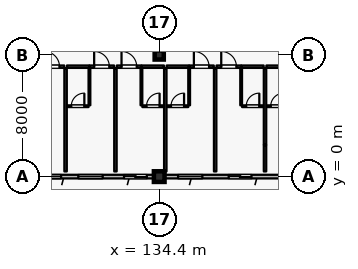
"""IFC4 building model, lengths in metres.
Left out: names, types, materials, properties, quantities, classifications, styles, units other than length and angle.
Written with IfcOpenShell. Run it as: python <this file> out.ifc"""

import sys

from ifc_helpers import new_model, si_unit, direction, frame, frame_2d, origin, origin_2d, place, context, subcontext, project, spatial, rectangle, extrude, element, fill, save


model = new_model("IFC4")
c1 = context("Model", 3, precision=1e-05, world=origin(), true_north=direction((0.0, 1.0)))
c2 = subcontext(c1, "Body", "Model", "MODEL_VIEW")
j1 = project(units=[si_unit("LENGTHUNIT", "METRE"), si_unit("PLANEANGLEUNIT", "RADIAN")], contexts=[c1])
p1 = place(None, origin())
s1 = spatial("IfcSite", under=j1, at=p1, CompositionType="ELEMENT")
p2 = place(p1, origin())
s2 = spatial("IfcBuilding", under=s1, at=p2, CompositionType="ELEMENT")
p3 = place(p2, frame((0.0, 0.0, 36.0)))
s3 = spatial("IfcBuildingStorey", under=s2, at=p3, CompositionType="ELEMENT", Elevation=36.0)
p4 = place(p3, frame((134.4, 0.0, 0.0), z_axis=(0.0, 0.0, 1.0), x_axis=(1.0, 0.0, 0.0)))
e1 = element("IfcColumn", 1, at=p4, inside=s3, PredefinedType="COLUMN", context=c2, shape_type="SweptSolid", body=[
    extrude(rectangle(XDim=0.7, YDim=0.7, at=origin_2d()), origin(), (0.0, 0.0, 1.0), 3.6),
])
p5 = place(p3, frame((134.4, 8.0, 0.0), z_axis=(0.0, 0.0, 1.0), x_axis=(1.0, 0.0, 0.0)))
e2 = element("IfcColumn", 2, at=p5, inside=s3, PredefinedType="COLUMN", context=c2, shape_type="SweptSolid", body=[
    extrude(rectangle(XDim=0.6, YDim=0.6, at=origin_2d()), origin(), (0.0, 0.0, 1.0), 3.6),
])
p6 = place(p3, frame((134.05, 0.0, 0.0), z_axis=(0.0, 0.0, 1.0), x_axis=(-1.0, 0.0, 0.0)))
e3 = element("IfcWall", 3, at=p6, inside=s3, PredefinedType="SOLIDWALL", context=c2, shape_type="SweptSolid", body=[
    extrude(rectangle(XDim=7.7, YDim=0.24, at=frame_2d((3.85, 0.0))), origin(), (0.0, 0.0, 1.0), 2.94),
])
p7 = place(p6, frame((0.465, 0.0, 0.0)))
e4 = element("IfcOpeningElement", 4, at=p7, cuts=e3, PredefinedType="OPENING", context=c2, shape_type="SweptSolid", body=[
    extrude(rectangle(XDim=1.5, YDim=2.25, at=frame_2d((0.75, 1.125))), frame((0.0, 0.13, 0.0), z_axis=(0.0, -1.0, 0.0), x_axis=(1.0, 0.0, 0.0)), (0.0, 0.0, 1.0), 0.26),
])
p8 = place(p6, frame((3.37, 0.0, 0.8)))
e5 = element("IfcOpeningElement", 5, at=p8, cuts=e3, PredefinedType="OPENING", context=c2, shape_type="SweptSolid", body=[
    extrude(rectangle(XDim=1.6, YDim=1.6, at=frame_2d((0.8, 0.8))), frame((0.0, 0.13, 0.0), z_axis=(0.0, -1.0, 0.0), x_axis=(1.0, 0.0, 0.0)), (0.0, 0.0, 1.0), 0.26),
])
p9 = place(p6, frame((6.105, 0.0, 0.8)))
e6 = element("IfcOpeningElement", 6, at=p9, cuts=e3, PredefinedType="OPENING", context=c2, shape_type="SweptSolid", body=[
    extrude(rectangle(XDim=1.4, YDim=1.6, at=frame_2d((0.7, 0.8))), frame((0.0, 0.13, 0.0), z_axis=(0.0, -1.0, 0.0), x_axis=(1.0, 0.0, 0.0)), (0.0, 0.0, 1.0), 0.26),
])
p10 = place(p3, frame((142.45, 0.0, 0.0), z_axis=(0.0, 0.0, 1.0), x_axis=(-1.0, 0.0, 0.0)))
e7 = element("IfcWall", 7, at=p10, inside=s3, PredefinedType="SOLIDWALL", context=c2, shape_type="SweptSolid", body=[
    extrude(rectangle(XDim=7.7, YDim=0.24, at=frame_2d((3.85, 0.0))), origin(), (0.0, 0.0, 1.0), 2.94),
])
p11 = place(p10, frame((1.98, 0.0, 0.0)))
e8 = element("IfcOpeningElement", 8, at=p11, cuts=e7, PredefinedType="OPENING", context=c2, shape_type="SweptSolid", body=[
    extrude(rectangle(XDim=1.5, YDim=2.25, at=frame_2d((0.75, 1.125))), frame((0.0, 0.13, 0.0), z_axis=(0.0, -1.0, 0.0), x_axis=(1.0, 0.0, 0.0)), (0.0, 0.0, 1.0), 0.26),
])
p12 = place(p10, frame((5.21, 0.0, 0.8)))
e9 = element("IfcOpeningElement", 9, at=p12, cuts=e7, PredefinedType="OPENING", context=c2, shape_type="SweptSolid", body=[
    extrude(rectangle(XDim=1.6, YDim=1.6, at=frame_2d((0.8, 0.8))), frame((0.0, 0.13, 0.0), z_axis=(0.0, -1.0, 0.0), x_axis=(1.0, 0.0, 0.0)), (0.0, 0.0, 1.0), 0.26),
])
p13 = place(p3, frame((126.53, 7.23, 0.0), z_axis=(0.0, 0.0, 1.0), x_axis=(1.0, 0.0, 0.0)))
e10 = element("IfcWall", 10, at=p13, inside=s3, PredefinedType="PARTITIONING", context=c2, shape_type="SweptSolid", body=[
    extrude(rectangle(XDim=1.62, YDim=0.16, at=frame_2d((0.81, 0.0))), origin(), (0.0, 0.0, 1.0), 3.365),
])
p14 = place(p13, frame((0.31, 0.0, 0.0)))
e11 = element("IfcOpeningElement", 11, at=p14, cuts=e10, PredefinedType="OPENING", context=c2, shape_type="SweptSolid", body=[
    extrude(rectangle(XDim=1.0, YDim=2.25, at=frame_2d((0.5, 1.125))), frame((0.0, 0.09, 0.0), z_axis=(0.0, -1.0, 0.0), x_axis=(1.0, 0.0, 0.0)), (0.0, 0.0, 1.0), 0.18),
])
p15 = place(p3, frame((128.33, 7.23, 0.0), z_axis=(0.0, 0.0, 1.0), x_axis=(1.0, 0.0, 0.0)))
e12 = element("IfcWall", 12, at=p15, inside=s3, PredefinedType="PARTITIONING", context=c2, shape_type="SweptSolid", body=[
    extrude(rectangle(XDim=1.47, YDim=0.16, at=frame_2d((0.735, 0.0))), origin(), (0.0, 0.0, 1.0), 3.365),
])
p16 = place(p3, frame((129.81, 7.23, 0.0), z_axis=(0.0, 0.0, 1.0), x_axis=(1.0, 0.0, 0.0)))
e13 = element("IfcWall", 13, at=p16, inside=s3, PredefinedType="PARTITIONING", context=c2, shape_type="SweptSolid", body=[
    extrude(rectangle(XDim=1.62, YDim=0.16, at=frame_2d((0.81, 0.0))), origin(), (0.0, 0.0, 1.0), 3.365),
])
p17 = place(p16, frame((0.31, 0.0, 0.0)))
e14 = element("IfcOpeningElement", 14, at=p17, cuts=e13, PredefinedType="OPENING", context=c2, shape_type="SweptSolid", body=[
    extrude(rectangle(XDim=1.0, YDim=2.25, at=frame_2d((0.5, 1.125))), frame((0.0, 0.09, 0.0), z_axis=(0.0, -1.0, 0.0), x_axis=(1.0, 0.0, 0.0)), (0.0, 0.0, 1.0), 0.18),
])
p18 = place(p3, frame((129.81, 4.69, 0.0), z_axis=(0.0, 0.0, 1.0), x_axis=(0.0, 1.0, 0.0)))
e15 = element("IfcWall", 15, at=p18, inside=s3, PredefinedType="PARTITIONING", context=c2, shape_type="SweptSolid", body=[
    extrude(rectangle(XDim=2.45, YDim=0.115, at=frame_2d((1.225, 0.0))), origin(), (0.0, 0.0, 1.0), 3.365),
])
p19 = place(p3, frame((128.34, 4.63, 0.0), z_axis=(0.0, 0.0, 1.0), x_axis=(1.0, 0.0, 0.0)))
e16 = element("IfcWall", 16, at=p19, inside=s3, PredefinedType="PARTITIONING", context=c2, shape_type="SweptSolid", body=[
    extrude(rectangle(XDim=1.41, YDim=0.115, at=frame_2d((0.705, 0.0))), origin(), (0.0, 0.0, 1.0), 3.365),
])
p20 = place(p19, frame((0.275, 0.0, 0.0)))
e17 = element("IfcOpeningElement", 17, at=p20, cuts=e16, PredefinedType="OPENING", context=c2, shape_type="SweptSolid", body=[
    extrude(rectangle(XDim=0.86, YDim=2.12, at=frame_2d((0.43, 1.06))), frame((0.0, 0.067, 0.0), z_axis=(0.0, -1.0, 0.0), x_axis=(1.0, 0.0, 0.0)), (0.0, 0.0, 1.0), 0.135),
])
p21 = place(p3, frame((128.24, 0.34, 0.0), z_axis=(0.0, 0.0, 1.0), x_axis=(0.0, 1.0, 0.0)))
e18 = element("IfcWall", 18, at=p21, inside=s3, PredefinedType="PARTITIONING", context=c2, shape_type="SweptSolid", body=[
    extrude(rectangle(XDim=6.8, YDim=0.16, at=frame_2d((3.4, 0.0))), origin(), (0.0, 0.0, 1.0), 3.365),
])
p22 = place(p3, frame((131.61, 7.23, 0.0), z_axis=(0.0, 0.0, 1.0), x_axis=(1.0, 0.0, 0.0)))
e19 = element("IfcWall", 19, at=p22, inside=s3, PredefinedType="PARTITIONING", context=c2, shape_type="SweptSolid", body=[
    extrude(rectangle(XDim=1.62, YDim=0.16, at=frame_2d((0.81, 0.0))), origin(), (0.0, 0.0, 1.0), 3.365),
])
p23 = place(p22, frame((0.31, 0.0, 0.0)))
e20 = element("IfcOpeningElement", 20, at=p23, cuts=e19, PredefinedType="OPENING", context=c2, shape_type="SweptSolid", body=[
    extrude(rectangle(XDim=1.0, YDim=2.25, at=frame_2d((0.5, 1.125))), frame((0.0, 0.09, 0.0), z_axis=(0.0, -1.0, 0.0), x_axis=(1.0, 0.0, 0.0)), (0.0, 0.0, 1.0), 0.18),
])
p24 = place(p3, frame((133.24, 7.23, 0.0), z_axis=(0.0, 0.0, 1.0), x_axis=(1.0, 0.0, 0.0)))
e21 = element("IfcWall", 21, at=p24, inside=s3, PredefinedType="PARTITIONING", context=c2, shape_type="SweptSolid", body=[
    extrude(rectangle(XDim=1.47, YDim=0.16, at=frame_2d((0.735, 0.0))), origin(), (0.0, 0.0, 1.0), 3.365),
])
p25 = place(p3, frame((133.23, 4.69, 0.0), z_axis=(0.0, 0.0, 1.0), x_axis=(0.0, 1.0, 0.0)))
e22 = element("IfcWall", 22, at=p25, inside=s3, PredefinedType="PARTITIONING", context=c2, shape_type="SweptSolid", body=[
    extrude(rectangle(XDim=2.45, YDim=0.115, at=frame_2d((1.225, 0.0))), origin(), (0.0, 0.0, 1.0), 3.365),
])
p26 = place(p3, frame((133.29, 4.63, 0.0), z_axis=(0.0, 0.0, 1.0), x_axis=(1.0, 0.0, 0.0)))
e23 = element("IfcWall", 23, at=p26, inside=s3, PredefinedType="PARTITIONING", context=c2, shape_type="SweptSolid", body=[
    extrude(rectangle(XDim=1.41, YDim=0.115, at=frame_2d((0.705, 0.0))), origin(), (0.0, 0.0, 1.0), 3.365),
])
p27 = place(p26, frame((0.275, 0.0, 0.0)))
e24 = element("IfcOpeningElement", 24, at=p27, cuts=e23, PredefinedType="OPENING", context=c2, shape_type="SweptSolid", body=[
    extrude(rectangle(XDim=0.86, YDim=2.12, at=frame_2d((0.43, 1.06))), frame((0.0, 0.067, 0.0), z_axis=(0.0, -1.0, 0.0), x_axis=(1.0, 0.0, 0.0)), (0.0, 0.0, 1.0), 0.135),
])
p28 = place(p3, frame((131.52, 0.34, 0.0), z_axis=(0.0, 0.0, 1.0), x_axis=(0.0, 1.0, 0.0)))
e25 = element("IfcWall", 25, at=p28, inside=s3, PredefinedType="PARTITIONING", context=c2, shape_type="SweptSolid", body=[
    extrude(rectangle(XDim=6.8, YDim=0.16, at=frame_2d((3.4, 0.0))), origin(), (0.0, 0.0, 1.0), 3.365),
])
p29 = place(p3, frame((134.89, 7.23, 0.0), z_axis=(0.0, 0.0, 1.0), x_axis=(1.0, 0.0, 0.0)))
e26 = element("IfcWall", 26, at=p29, inside=s3, PredefinedType="PARTITIONING", context=c2, shape_type="SweptSolid", body=[
    extrude(rectangle(XDim=1.47, YDim=0.16, at=frame_2d((0.735, 0.0))), origin(), (0.0, 0.0, 1.0), 3.365),
])
p30 = place(p3, frame((136.37, 7.23, 0.0), z_axis=(0.0, 0.0, 1.0), x_axis=(1.0, 0.0, 0.0)))
e27 = element("IfcWall", 27, at=p30, inside=s3, PredefinedType="PARTITIONING", context=c2, shape_type="SweptSolid", body=[
    extrude(rectangle(XDim=1.62, YDim=0.16, at=frame_2d((0.81, 0.0))), origin(), (0.0, 0.0, 1.0), 3.365),
])
p31 = place(p30, frame((0.31, 0.0, 0.0)))
e28 = element("IfcOpeningElement", 28, at=p31, cuts=e27, PredefinedType="OPENING", context=c2, shape_type="SweptSolid", body=[
    extrude(rectangle(XDim=1.0, YDim=2.25, at=frame_2d((0.5, 1.125))), frame((0.0, 0.09, 0.0), z_axis=(0.0, -1.0, 0.0), x_axis=(1.0, 0.0, 0.0)), (0.0, 0.0, 1.0), 0.18),
])
p32 = place(p3, frame((136.37, 4.69, 0.0), z_axis=(0.0, 0.0, 1.0), x_axis=(0.0, 1.0, 0.0)))
e29 = element("IfcWall", 29, at=p32, inside=s3, PredefinedType="PARTITIONING", context=c2, shape_type="SweptSolid", body=[
    extrude(rectangle(XDim=2.45, YDim=0.115, at=frame_2d((1.225, 0.0))), origin(), (0.0, 0.0, 1.0), 3.365),
])
p33 = place(p3, frame((134.9, 4.63, 0.0), z_axis=(0.0, 0.0, 1.0), x_axis=(1.0, 0.0, 0.0)))
e30 = element("IfcWall", 30, at=p33, inside=s3, PredefinedType="PARTITIONING", context=c2, shape_type="SweptSolid", body=[
    extrude(rectangle(XDim=1.41, YDim=0.115, at=frame_2d((0.705, 0.0))), origin(), (0.0, 0.0, 1.0), 3.365),
])
p34 = place(p33, frame((0.275, 0.0, 0.0)))
e31 = element("IfcOpeningElement", 31, at=p34, cuts=e30, PredefinedType="OPENING", context=c2, shape_type="SweptSolid", body=[
    extrude(rectangle(XDim=0.86, YDim=2.12, at=frame_2d((0.43, 1.06))), frame((0.0, 0.067, 0.0), z_axis=(0.0, -1.0, 0.0), x_axis=(1.0, 0.0, 0.0)), (0.0, 0.0, 1.0), 0.135),
])
p35 = place(p3, frame((134.8, 0.34, 0.0), z_axis=(0.0, 0.0, 1.0), x_axis=(0.0, 1.0, 0.0)))
e32 = element("IfcWall", 32, at=p35, inside=s3, PredefinedType="PARTITIONING", context=c2, shape_type="SweptSolid", body=[
    extrude(rectangle(XDim=6.8, YDim=0.16, at=frame_2d((3.4, 0.0))), origin(), (0.0, 0.0, 1.0), 3.365),
])
p36 = place(p3, frame((138.17, 7.23, 0.0), z_axis=(0.0, 0.0, 1.0), x_axis=(1.0, 0.0, 0.0)))
e33 = element("IfcWall", 33, at=p36, inside=s3, PredefinedType="PARTITIONING", context=c2, shape_type="SweptSolid", body=[
    extrude(rectangle(XDim=1.62, YDim=0.16, at=frame_2d((0.81, 0.0))), origin(), (0.0, 0.0, 1.0), 3.365),
])
p37 = place(p36, frame((0.31, 0.0, 0.0)))
e34 = element("IfcOpeningElement", 34, at=p37, cuts=e33, PredefinedType="OPENING", context=c2, shape_type="SweptSolid", body=[
    extrude(rectangle(XDim=1.0, YDim=2.25, at=frame_2d((0.5, 1.125))), frame((0.0, 0.09, 0.0), z_axis=(0.0, -1.0, 0.0), x_axis=(1.0, 0.0, 0.0)), (0.0, 0.0, 1.0), 0.18),
])
p38 = place(p3, frame((139.8, 7.23, 0.0), z_axis=(0.0, 0.0, 1.0), x_axis=(1.0, 0.0, 0.0)))
e35 = element("IfcWall", 35, at=p38, inside=s3, PredefinedType="PARTITIONING", context=c2, shape_type="SweptSolid", body=[
    extrude(rectangle(XDim=1.47, YDim=0.16, at=frame_2d((0.735, 0.0))), origin(), (0.0, 0.0, 1.0), 3.365),
])
p39 = place(p3, frame((139.79, 4.69, 0.0), z_axis=(0.0, 0.0, 1.0), x_axis=(0.0, 1.0, 0.0)))
e36 = element("IfcWall", 36, at=p39, inside=s3, PredefinedType="PARTITIONING", context=c2, shape_type="SweptSolid", body=[
    extrude(rectangle(XDim=2.45, YDim=0.115, at=frame_2d((1.225, 0.0))), origin(), (0.0, 0.0, 1.0), 3.365),
])
p40 = place(p3, frame((139.85, 4.63, 0.0), z_axis=(0.0, 0.0, 1.0), x_axis=(1.0, 0.0, 0.0)))
e37 = element("IfcWall", 37, at=p40, inside=s3, PredefinedType="PARTITIONING", context=c2, shape_type="SweptSolid", body=[
    extrude(rectangle(XDim=1.41, YDim=0.115, at=frame_2d((0.705, 0.0))), origin(), (0.0, 0.0, 1.0), 3.365),
])
p41 = place(p40, frame((0.275, 0.0, 0.0)))
e38 = element("IfcOpeningElement", 38, at=p41, cuts=e37, PredefinedType="OPENING", context=c2, shape_type="SweptSolid", body=[
    extrude(rectangle(XDim=0.86, YDim=2.12, at=frame_2d((0.43, 1.06))), frame((0.0, 0.067, 0.0), z_axis=(0.0, -1.0, 0.0), x_axis=(1.0, 0.0, 0.0)), (0.0, 0.0, 1.0), 0.135),
])
p42 = place(p3, frame((138.08, 0.34, 0.0), z_axis=(0.0, 0.0, 1.0), x_axis=(0.0, 1.0, 0.0)))
e39 = element("IfcWall", 39, at=p42, inside=s3, PredefinedType="PARTITIONING", context=c2, shape_type="SweptSolid", body=[
    extrude(rectangle(XDim=6.8, YDim=0.16, at=frame_2d((3.4, 0.0))), origin(), (0.0, 0.0, 1.0), 3.365),
])
p43 = place(p3, frame((141.36, 0.34, 0.0), z_axis=(0.0, 0.0, 1.0), x_axis=(0.0, 1.0, 0.0)))
e40 = element("IfcWall", 40, at=p43, inside=s3, PredefinedType="PARTITIONING", context=c2, shape_type="SweptSolid", body=[
    extrude(rectangle(XDim=1.74, YDim=0.16, at=frame_2d((0.87, 0.0))), origin(), (0.0, 0.0, 1.0), 3.365),
])
p44 = place(p3, frame((141.45, 7.23, 0.0), z_axis=(0.0, 0.0, 1.0), x_axis=(1.0, 0.0, 0.0)))
e41 = element("IfcWall", 41, at=p44, inside=s3, PredefinedType="PARTITIONING", context=c2, shape_type="SweptSolid", body=[
    extrude(rectangle(XDim=1.47, YDim=0.16, at=frame_2d((0.735, 0.0))), origin(), (0.0, 0.0, 1.0), 3.365),
])
p45 = place(p3, frame((141.46, 4.63, 0.0), z_axis=(0.0, 0.0, 1.0), x_axis=(1.0, 0.0, 0.0)))
e42 = element("IfcWall", 42, at=p45, inside=s3, PredefinedType="PARTITIONING", context=c2, shape_type="SweptSolid", body=[
    extrude(rectangle(XDim=1.41, YDim=0.115, at=frame_2d((0.705, 0.0))), origin(), (0.0, 0.0, 1.0), 3.365),
])
p46 = place(p45, frame((0.275, 0.0, 0.0)))
e43 = element("IfcOpeningElement", 43, at=p46, cuts=e42, PredefinedType="OPENING", context=c2, shape_type="SweptSolid", body=[
    extrude(rectangle(XDim=0.86, YDim=2.12, at=frame_2d((0.43, 1.06))), frame((0.0, 0.067, 0.0), z_axis=(0.0, -1.0, 0.0), x_axis=(1.0, 0.0, 0.0)), (0.0, 0.0, 1.0), 0.135),
])
p47 = place(p3, frame((141.36, 2.09, 0.0), z_axis=(0.0, 0.0, 1.0), x_axis=(0.0, 1.0, 0.0)))
e44 = element("IfcWall", 44, at=p47, inside=s3, PredefinedType="PARTITIONING", context=c2, shape_type="SweptSolid", body=[
    extrude(rectangle(XDim=5.05, YDim=0.16, at=frame_2d((2.525, 0.0))), origin(), (0.0, 0.0, 1.0), 3.365),
])
p48 = place(p7, origin())
e45 = element("IfcDoor", 45, at=p48, inside=s3, OperationType="SLIDING_TO_LEFT", PredefinedType="DOOR", context=c2, shape_type="SweptSolid", body=[
    extrude(rectangle(XDim=1.5, YDim=2.25, at=frame_2d((0.75, 1.125))), frame((0.0, 0.025, 0.0), z_axis=(0.0, -1.0, 0.0), x_axis=(1.0, 0.0, 0.0)), (0.0, 0.0, 1.0), 0.05),
])
fill(e4, e45)
p49 = place(p8, origin())
e46 = element("IfcWindow", 46, at=p49, inside=s3, PartitioningType="SINGLE_PANEL", PredefinedType="WINDOW", context=c2, shape_type="SweptSolid", body=[
    extrude(rectangle(XDim=1.6, YDim=1.6, at=frame_2d((0.8, 0.8))), frame((0.0, 0.03, 0.0), z_axis=(0.0, -1.0, 0.0), x_axis=(1.0, 0.0, 0.0)), (0.0, 0.0, 1.0), 0.06),
])
fill(e5, e46)
p50 = place(p9, origin())
e47 = element("IfcWindow", 47, at=p50, inside=s3, PartitioningType="SINGLE_PANEL", PredefinedType="WINDOW", context=c2, shape_type="SweptSolid", body=[
    extrude(rectangle(XDim=1.4, YDim=1.6, at=frame_2d((0.7, 0.8))), frame((0.0, 0.03, 0.0), z_axis=(0.0, -1.0, 0.0), x_axis=(1.0, 0.0, 0.0)), (0.0, 0.0, 1.0), 0.06),
])
fill(e6, e47)
p51 = place(p11, origin())
e48 = element("IfcDoor", 48, at=p51, inside=s3, OperationType="SLIDING_TO_LEFT", PredefinedType="DOOR", context=c2, shape_type="SweptSolid", body=[
    extrude(rectangle(XDim=1.5, YDim=2.25, at=frame_2d((0.75, 1.125))), frame((0.0, 0.025, 0.0), z_axis=(0.0, -1.0, 0.0), x_axis=(1.0, 0.0, 0.0)), (0.0, 0.0, 1.0), 0.05),
])
fill(e8, e48)
p52 = place(p12, origin())
e49 = element("IfcWindow", 49, at=p52, inside=s3, PartitioningType="SINGLE_PANEL", PredefinedType="WINDOW", context=c2, shape_type="SweptSolid", body=[
    extrude(rectangle(XDim=1.6, YDim=1.6, at=frame_2d((0.8, 0.8))), frame((0.0, 0.03, 0.0), z_axis=(0.0, -1.0, 0.0), x_axis=(1.0, 0.0, 0.0)), (0.0, 0.0, 1.0), 0.06),
])
fill(e9, e49)
p53 = place(p14, origin())
e50 = element("IfcDoor", 50, at=p53, inside=s3, OperationType="SINGLE_SWING_LEFT", PredefinedType="DOOR", context=c2, shape_type="SweptSolid", body=[
    extrude(rectangle(XDim=1.0, YDim=2.25, at=frame_2d((0.5, 1.125))), frame((0.0, 0.025, 0.0), z_axis=(0.0, -1.0, 0.0), x_axis=(1.0, 0.0, 0.0)), (0.0, 0.0, 1.0), 0.05),
])
fill(e11, e50)
p54 = place(p17, origin())
e51 = element("IfcDoor", 51, at=p54, inside=s3, OperationType="SINGLE_SWING_LEFT", PredefinedType="DOOR", context=c2, shape_type="SweptSolid", body=[
    extrude(rectangle(XDim=1.0, YDim=2.25, at=frame_2d((0.5, 1.125))), frame((0.0, 0.025, 0.0), z_axis=(0.0, -1.0, 0.0), x_axis=(1.0, 0.0, 0.0)), (0.0, 0.0, 1.0), 0.05),
])
fill(e14, e51)
p55 = place(p20, origin())
e52 = element("IfcDoor", 52, at=p55, inside=s3, OperationType="SINGLE_SWING_RIGHT", PredefinedType="DOOR", context=c2, shape_type="SweptSolid", body=[
    extrude(rectangle(XDim=0.86, YDim=2.12, at=frame_2d((0.43, 1.06))), frame((0.0, 0.025, 0.0), z_axis=(0.0, -1.0, 0.0), x_axis=(1.0, 0.0, 0.0)), (0.0, 0.0, 1.0), 0.05),
])
fill(e17, e52)
p56 = place(p23, origin())
e53 = element("IfcDoor", 53, at=p56, inside=s3, OperationType="SINGLE_SWING_LEFT", PredefinedType="DOOR", context=c2, shape_type="SweptSolid", body=[
    extrude(rectangle(XDim=1.0, YDim=2.25, at=frame_2d((0.5, 1.125))), frame((0.0, 0.025, 0.0), z_axis=(0.0, -1.0, 0.0), x_axis=(1.0, 0.0, 0.0)), (0.0, 0.0, 1.0), 0.05),
])
fill(e20, e53)
p57 = place(p27, origin())
e54 = element("IfcDoor", 54, at=p57, inside=s3, OperationType="SINGLE_SWING_RIGHT", PredefinedType="DOOR", context=c2, shape_type="SweptSolid", body=[
    extrude(rectangle(XDim=0.86, YDim=2.12, at=frame_2d((0.43, 1.06))), frame((0.0, 0.025, 0.0), z_axis=(0.0, -1.0, 0.0), x_axis=(1.0, 0.0, 0.0)), (0.0, 0.0, 1.0), 0.05),
])
fill(e24, e54)
p58 = place(p31, origin())
e55 = element("IfcDoor", 55, at=p58, inside=s3, OperationType="SINGLE_SWING_LEFT", PredefinedType="DOOR", context=c2, shape_type="SweptSolid", body=[
    extrude(rectangle(XDim=1.0, YDim=2.25, at=frame_2d((0.5, 1.125))), frame((0.0, 0.025, 0.0), z_axis=(0.0, -1.0, 0.0), x_axis=(1.0, 0.0, 0.0)), (0.0, 0.0, 1.0), 0.05),
])
fill(e28, e55)
p59 = place(p34, origin())
e56 = element("IfcDoor", 56, at=p59, inside=s3, OperationType="SINGLE_SWING_RIGHT", PredefinedType="DOOR", context=c2, shape_type="SweptSolid", body=[
    extrude(rectangle(XDim=0.86, YDim=2.12, at=frame_2d((0.43, 1.06))), frame((0.0, 0.025, 0.0), z_axis=(0.0, -1.0, 0.0), x_axis=(1.0, 0.0, 0.0)), (0.0, 0.0, 1.0), 0.05),
])
fill(e31, e56)
p60 = place(p37, origin())
e57 = element("IfcDoor", 57, at=p60, inside=s3, OperationType="SINGLE_SWING_LEFT", PredefinedType="DOOR", context=c2, shape_type="SweptSolid", body=[
    extrude(rectangle(XDim=1.0, YDim=2.25, at=frame_2d((0.5, 1.125))), frame((0.0, 0.025, 0.0), z_axis=(0.0, -1.0, 0.0), x_axis=(1.0, 0.0, 0.0)), (0.0, 0.0, 1.0), 0.05),
])
fill(e34, e57)
p61 = place(p41, origin())
e58 = element("IfcDoor", 58, at=p61, inside=s3, OperationType="SINGLE_SWING_RIGHT", PredefinedType="DOOR", context=c2, shape_type="SweptSolid", body=[
    extrude(rectangle(XDim=0.86, YDim=2.12, at=frame_2d((0.43, 1.06))), frame((0.0, 0.025, 0.0), z_axis=(0.0, -1.0, 0.0), x_axis=(1.0, 0.0, 0.0)), (0.0, 0.0, 1.0), 0.05),
])
fill(e38, e58)
p62 = place(p46, origin())
e59 = element("IfcDoor", 59, at=p62, inside=s3, OperationType="SINGLE_SWING_RIGHT", PredefinedType="DOOR", context=c2, shape_type="SweptSolid", body=[
    extrude(rectangle(XDim=0.86, YDim=2.12, at=frame_2d((0.43, 1.06))), frame((0.0, 0.025, 0.0), z_axis=(0.0, -1.0, 0.0), x_axis=(1.0, 0.0, 0.0)), (0.0, 0.0, 1.0), 0.05),
])
fill(e43, e59)
save(model, sys.argv[1])
